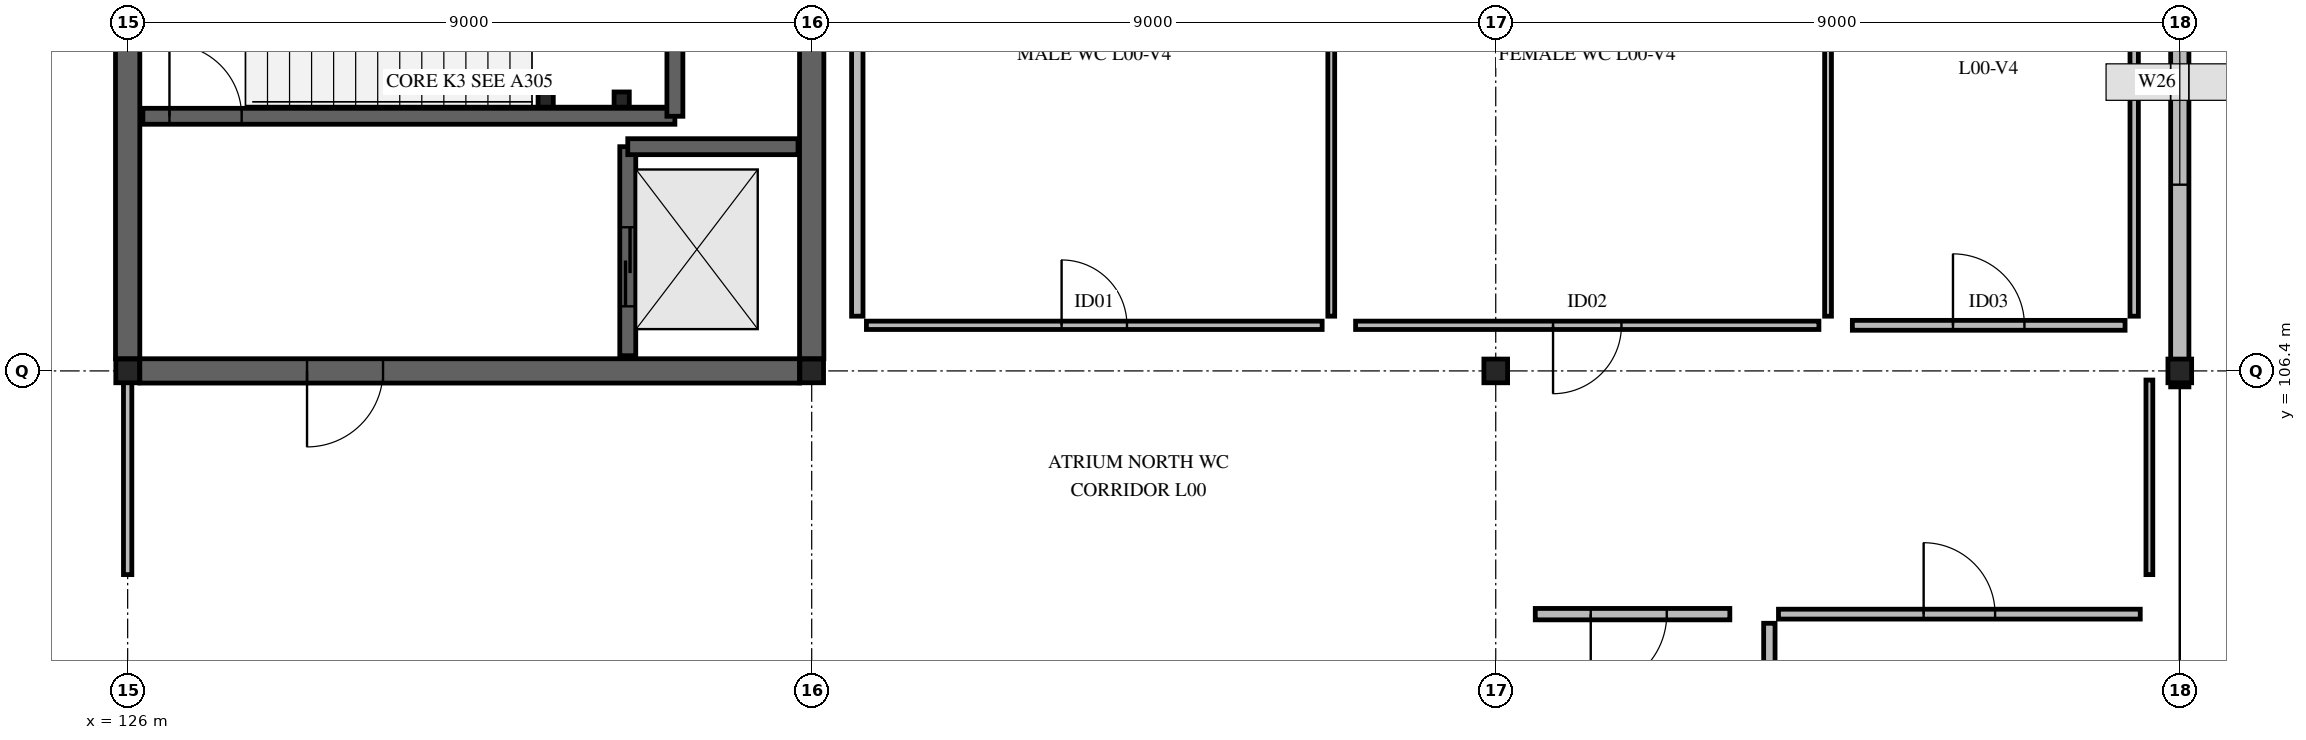
"""IFC4 building model, lengths in metres.
Left out: names, types, materials, properties, quantities, classifications, styles, units other than length and angle.
Written with IfcOpenShell. Run it as: python <this file> out.ifc"""

import sys

from ifc_helpers import new_model, si_unit, direction, frame, frame_2d, origin, origin_2d, place, context, subcontext, project, spatial, rectangle, hollow_rectangle, i_section, extrude, element, fill, save


model = new_model("IFC4")
c1 = context("Model", 3, precision=1e-05, world=origin(), true_north=direction((0.0, 1.0)))
c2 = subcontext(c1, "Body", "Model", "MODEL_VIEW")
j1 = project(units=[si_unit("LENGTHUNIT", "METRE"), si_unit("PLANEANGLEUNIT", "RADIAN")], contexts=[c1])
p1 = place(None, origin())
s1 = spatial("IfcSite", under=j1, at=p1, CompositionType="ELEMENT")
p2 = place(p1, origin())
s2 = spatial("IfcBuilding", under=s1, at=p2, CompositionType="ELEMENT")
p3 = place(p2, origin())
s3 = spatial("IfcBuildingStorey", under=s2, at=p3, CompositionType="ELEMENT", Elevation=0.0)
for number, where, z_axis, x_axis in (
    (1, (126.0, 106.4, 0.0), (0.0, 0.0, 1.0), (1.0, 0.0, 0.0)),
    (2, (135.0, 106.4, 0.0), (0.0, 0.0, 1.0), (1.0, 0.0, 0.0)),
    (3, (144.0, 106.4, 0.0), (0.0, 0.0, 1.0), (1.0, 0.0, 0.0)),
    (4, (153.0, 106.4, 0.0), (0.0, 0.0, 1.0), (1.0, 0.0, 0.0)),
):
    element("IfcColumn", number, at=place(p3, frame(where, z_axis=z_axis, x_axis=x_axis)), inside=s3, PredefinedType="COLUMN", context=c2, shape_type="SweptSolid", body=[
        extrude(i_section(OverallWidth=0.312, OverallDepth=0.312, WebThickness=0.017, FlangeThickness=0.017, FilletRadius=0.015, at=origin_2d()), origin(), (0.0, 0.0, 1.0), 5.04),
    ])
p4 = place(p3, frame((153.0, 106.19, 0.0), z_axis=(0.0, 0.0, 1.0), x_axis=(0.0, 1.0, 0.0)))
e5 = element("IfcWall", 5, at=p4, inside=s3, PredefinedType="STANDARD", context=c2, shape_type="SweptSolid", body=[
    extrude(rectangle(XDim=7.81, YDim=0.24, at=frame_2d((3.905, 0.0))), origin(), (0.0, 0.0, 1.0), 4.508),
])
p5 = place(p4, frame((2.66, 0.0, 0.85)))
e6 = element("IfcOpeningElement", 6, at=p5, cuts=e5, PredefinedType="OPENING", context=c2, shape_type="SweptSolid", body=[
    extrude(rectangle(XDim=2.7, YDim=1.5, at=frame_2d((1.35, 0.75))), frame((0.0, 0.13, 0.0), z_axis=(0.0, -1.0, 0.0), x_axis=(1.0, 0.0, 0.0)), (0.0, 0.0, 1.0), 0.26),
])
p6 = place(p3, frame((126.16, 106.4, 0.0), z_axis=(0.0, 0.0, 1.0), x_axis=(1.0, 0.0, 0.0)))
e7 = element("IfcWall", 7, at=p6, inside=s3, PredefinedType="SHEAR", context=c2, shape_type="SweptSolid", body=[
    extrude(rectangle(XDim=8.68, YDim=0.32, at=frame_2d((4.34, 0.0))), origin(), (0.0, 0.0, 1.0), 4.76),
])
p7 = place(p6, frame((2.2, 0.0, 0.0)))
e8 = element("IfcOpeningElement", 8, at=p7, cuts=e7, PredefinedType="OPENING", context=c2, shape_type="SweptSolid", body=[
    extrude(rectangle(XDim=1.0, YDim=2.15, at=frame_2d((0.5, 1.075))), frame((0.0, 0.17, 0.0), z_axis=(0.0, -1.0, 0.0), x_axis=(1.0, 0.0, 0.0)), (0.0, 0.0, 1.0), 0.34),
])
for number, where, z_axis, x_axis in (
    (9, (126.0, 106.56, 0.0), (0.0, 0.0, 1.0), (0.0, 1.0, 0.0)),
    (10, (135.0, 106.56, 0.0), (0.0, 0.0, 1.0), (0.0, 1.0, 0.0)),
):
    element("IfcWall", number, at=place(p3, frame(where, z_axis=z_axis, x_axis=x_axis)), inside=s3, PredefinedType="SHEAR", context=c2, shape_type="SweptSolid", body=[
        extrude(rectangle(XDim=7.28, YDim=0.32, at=frame_2d((3.64, 0.0))), origin(), (0.0, 0.0, 1.0), 4.76),
    ])
p8 = place(p3, frame((126.2, 109.75, 0.0), z_axis=(0.0, 0.0, 1.0), x_axis=(1.0, 0.0, 0.0)))
e11 = element("IfcWall", 11, at=p8, inside=s3, PredefinedType="SOLIDWALL", context=c2, shape_type="SweptSolid", body=[
    extrude(rectangle(XDim=7.0, YDim=0.21, at=frame_2d((3.5, 0.0))), origin(), (0.0, 0.0, 1.0), 4.76),
])
p9 = place(p8, frame((0.35, 0.0, 0.0)))
e12 = element("IfcOpeningElement", 12, at=p9, cuts=e11, PredefinedType="OPENING", context=c2, shape_type="SweptSolid", body=[
    extrude(rectangle(XDim=0.95, YDim=2.12, at=frame_2d((0.475, 1.06))), frame((0.0, 0.115, 0.0), z_axis=(0.0, -1.0, 0.0), x_axis=(1.0, 0.0, 0.0)), (0.0, 0.0, 1.0), 0.23),
])
p10 = place(p3, frame((133.2, 109.75, 0.0), z_axis=(0.0, 0.0, 1.0), x_axis=(0.0, 1.0, 0.0)))
e13 = element("IfcWall", 13, at=p10, inside=s3, PredefinedType="SOLIDWALL", context=c2, shape_type="SweptSolid", body=[
    extrude(rectangle(XDim=4.05, YDim=0.21, at=frame_2d((2.025, 0.0))), origin(), (0.0, 0.0, 1.0), 4.76),
])
p11 = place(p3, frame((132.58, 106.6, 0.0), z_axis=(0.0, 0.0, 1.0), x_axis=(0.0, 1.0, 0.0)))
e14 = element("IfcWall", 14, at=p11, inside=s3, PredefinedType="SOLIDWALL", context=c2, shape_type="SweptSolid", body=[
    extrude(rectangle(XDim=2.75, YDim=0.21, at=frame_2d((1.375, 0.0))), origin(), (0.0, 0.0, 1.0), 4.76),
])
p12 = place(p11, frame((0.65, 0.0, 0.0)))
e15 = element("IfcOpeningElement", 15, at=p12, cuts=e14, PredefinedType="OPENING", context=c2, shape_type="SweptSolid", body=[
    extrude(rectangle(XDim=1.04, YDim=2.1, at=frame_2d((0.52, 1.05))), frame((0.0, 0.115, 0.0), z_axis=(0.0, -1.0, 0.0), x_axis=(1.0, 0.0, 0.0)), (0.0, 0.0, 1.0), 0.23),
])
p13 = place(p3, frame((132.58, 109.35, 0.0), z_axis=(0.0, 0.0, 1.0), x_axis=(1.0, 0.0, 0.0)))
e16 = element("IfcWall", 16, at=p13, inside=s3, PredefinedType="SOLIDWALL", context=c2, shape_type="SweptSolid", body=[
    extrude(rectangle(XDim=2.24, YDim=0.21, at=frame_2d((1.12, 0.0))), origin(), (0.0, 0.0, 1.0), 4.76),
])
for number, where, z_axis, x_axis in (
    (17, (131.5, 109.97, 0.0), (0.0, 0.0, 1.0), (1.0, 0.0, 0.0)),
    (18, (132.5, 109.97, 0.0), (0.0, 0.0, 1.0), (1.0, 0.0, 0.0)),
):
    element("IfcColumn", number, at=place(p3, frame(where, z_axis=z_axis, x_axis=x_axis)), inside=s3, PredefinedType="COLUMN", context=c2, shape_type="SweptSolid", body=[
        extrude(hollow_rectangle(XDim=0.2, YDim=0.2, WallThickness=0.012, at=origin_2d()), origin(), (0.0, 0.0, 1.0), 5.04),
    ])
p14 = place(p3, frame((135.72, 107.0, 0.0), z_axis=(0.0, 0.0, 1.0), x_axis=(1.0, 0.0, 0.0)))
e19 = element("IfcWall", 19, at=p14, inside=s3, PredefinedType="PARTITIONING", context=c2, shape_type="SweptSolid", body=[
    extrude(rectangle(XDim=5.996, YDim=0.11, at=frame_2d((2.998, 0.0))), origin(), (0.0, 0.0, 1.0), 4.76),
])
p15 = place(p14, frame((2.568, 0.0, 0.0)))
e20 = element("IfcOpeningElement", 20, at=p15, cuts=e19, PredefinedType="OPENING", context=c2, shape_type="SweptSolid", body=[
    extrude(rectangle(XDim=0.86, YDim=2.06, at=frame_2d((0.43, 1.03))), frame((0.0, 0.065, 0.0), z_axis=(0.0, -1.0, 0.0), x_axis=(1.0, 0.0, 0.0)), (0.0, 0.0, 1.0), 0.13),
])
p16 = place(p3, frame((141.836, 107.12, 0.0), z_axis=(0.0, 0.0, 1.0), x_axis=(0.0, 1.0, 0.0)))
e21 = element("IfcWall", 21, at=p16, inside=s3, PredefinedType="PARTITIONING", context=c2, shape_type="SweptSolid", body=[
    extrude(rectangle(XDim=6.16, YDim=0.09, at=frame_2d((3.08, 0.0))), origin(), (0.0, 0.0, 1.0), 4.76),
])
p17 = place(p3, frame((135.6, 107.12, 0.0), z_axis=(0.0, 0.0, 1.0), x_axis=(0.0, 1.0, 0.0)))
e22 = element("IfcWall", 22, at=p17, inside=s3, PredefinedType="PARTITIONING", context=c2, shape_type="SweptSolid", body=[
    extrude(rectangle(XDim=6.16, YDim=0.15, at=frame_2d((3.08, 0.0))), origin(), (0.0, 0.0, 1.0), 4.76),
])
p18 = place(p3, frame((142.156, 107.0, 0.0), z_axis=(0.0, 0.0, 1.0), x_axis=(1.0, 0.0, 0.0)))
e23 = element("IfcWall", 23, at=p18, inside=s3, PredefinedType="PARTITIONING", context=c2, shape_type="SweptSolid", body=[
    extrude(rectangle(XDim=6.096, YDim=0.11, at=frame_2d((3.048, 0.0))), origin(), (0.0, 0.0, 1.0), 4.76),
])
p19 = place(p18, frame((2.598, 0.0, 0.0)))
e24 = element("IfcOpeningElement", 24, at=p19, cuts=e23, PredefinedType="OPENING", context=c2, shape_type="SweptSolid", body=[
    extrude(rectangle(XDim=0.9, YDim=2.06, at=frame_2d((0.45, 1.03))), frame((0.0, 0.065, 0.0), z_axis=(0.0, -1.0, 0.0), x_axis=(1.0, 0.0, 0.0)), (0.0, 0.0, 1.0), 0.13),
])
p20 = place(p3, frame((148.372, 107.12, 0.0), z_axis=(0.0, 0.0, 1.0), x_axis=(0.0, 1.0, 0.0)))
e25 = element("IfcWall", 25, at=p20, inside=s3, PredefinedType="PARTITIONING", context=c2, shape_type="SweptSolid", body=[
    extrude(rectangle(XDim=6.16, YDim=0.09, at=frame_2d((3.08, 0.0))), origin(), (0.0, 0.0, 1.0), 4.76),
])
p21 = place(p3, frame((148.692, 107.0, 0.0), z_axis=(0.0, 0.0, 1.0), x_axis=(1.0, 0.0, 0.0)))
e26 = element("IfcWall", 26, at=p21, inside=s3, PredefinedType="PARTITIONING", context=c2, shape_type="SweptSolid", body=[
    extrude(rectangle(XDim=3.588, YDim=0.13, at=frame_2d((1.794, 0.0))), origin(), (0.0, 0.0, 1.0), 4.76),
])
p22 = place(p21, frame((1.324, 0.0, 0.0)))
e27 = element("IfcOpeningElement", 27, at=p22, cuts=e26, PredefinedType="OPENING", context=c2, shape_type="SweptSolid", body=[
    extrude(rectangle(XDim=0.94, YDim=2.06, at=frame_2d((0.47, 1.03))), frame((0.0, 0.075, 0.0), z_axis=(0.0, -1.0, 0.0), x_axis=(1.0, 0.0, 0.0)), (0.0, 0.0, 1.0), 0.15),
])
p23 = place(p3, frame((152.4, 107.12, 0.0), z_axis=(0.0, 0.0, 1.0), x_axis=(0.0, 1.0, 0.0)))
e28 = element("IfcWall", 28, at=p23, inside=s3, PredefinedType="PARTITIONING", context=c2, shape_type="SweptSolid", body=[
    extrude(rectangle(XDim=6.16, YDim=0.11, at=frame_2d((3.08, 0.0))), origin(), (0.0, 0.0, 1.0), 4.76),
])
p24 = place(p3, frame((147.6, 61.32, 0.0), z_axis=(0.0, 0.0, 1.0), x_axis=(0.0, 1.0, 0.0)))
e29 = element("IfcWall", 29, at=p24, inside=s3, PredefinedType="PARTITIONING", context=c2, shape_type="SweptSolid", body=[
    extrude(rectangle(XDim=41.76, YDim=0.15, at=frame_2d((20.88, 0.0))), origin(), (0.0, 0.0, 1.0), 4.76),
])
p25 = place(p24, frame((20.13, 0.0, 0.0)))
e30 = element("IfcOpeningElement", 30, at=p25, cuts=e29, PredefinedType="OPENING", context=c2, shape_type="SweptSolid", body=[
    extrude(rectangle(XDim=1.0, YDim=2.15, at=frame_2d((0.5, 1.075))), frame((0.0, 0.085, 0.0), z_axis=(0.0, -1.0, 0.0), x_axis=(1.0, 0.0, 0.0)), (0.0, 0.0, 1.0), 0.17),
])
p26 = place(p3, frame((147.72, 103.2, 0.0), z_axis=(0.0, 0.0, 1.0), x_axis=(1.0, 0.0, 0.0)))
e31 = element("IfcWall", 31, at=p26, inside=s3, PredefinedType="PARTITIONING", context=c2, shape_type="SweptSolid", body=[
    extrude(rectangle(XDim=4.76, YDim=0.13, at=frame_2d((2.38, 0.0))), origin(), (0.0, 0.0, 1.0), 4.76),
])
p27 = place(p26, frame((1.91, 0.0, 0.0)))
e32 = element("IfcOpeningElement", 32, at=p27, cuts=e31, PredefinedType="OPENING", context=c2, shape_type="SweptSolid", body=[
    extrude(rectangle(XDim=0.94, YDim=2.06, at=frame_2d((0.47, 1.03))), frame((0.0, 0.075, 0.0), z_axis=(0.0, -1.0, 0.0), x_axis=(1.0, 0.0, 0.0)), (0.0, 0.0, 1.0), 0.15),
])
p28 = place(p3, frame((144.52, 103.2, 0.0), z_axis=(0.0, 0.0, 1.0), x_axis=(1.0, 0.0, 0.0)))
e33 = element("IfcWall", 33, at=p28, inside=s3, PredefinedType="PARTITIONING", context=c2, shape_type="SweptSolid", body=[
    extrude(rectangle(XDim=2.56, YDim=0.15, at=frame_2d((1.28, 0.0))), origin(), (0.0, 0.0, 1.0), 4.76),
])
p29 = place(p28, frame((0.73, 0.0, 0.0)))
e34 = element("IfcOpeningElement", 34, at=p29, cuts=e33, PredefinedType="OPENING", context=c2, shape_type="SweptSolid", body=[
    extrude(rectangle(XDim=1.0, YDim=2.15, at=frame_2d((0.5, 1.075))), frame((0.0, 0.085, 0.0), z_axis=(0.0, -1.0, 0.0), x_axis=(1.0, 0.0, 0.0)), (0.0, 0.0, 1.0), 0.17),
])
p30 = place(p3, frame((126.0, 103.72, 0.0), z_axis=(0.0, 0.0, 1.0), x_axis=(0.0, 1.0, 0.0)))
e35 = element("IfcWall", 35, at=p30, inside=s3, PredefinedType="PARTITIONING", context=c2, shape_type="SweptSolid", body=[
    extrude(rectangle(XDim=2.56, YDim=0.11, at=frame_2d((1.28, 0.0))), origin(), (0.0, 0.0, 1.0), 4.351),
])
p31 = place(p3, frame((152.6, 103.72, 0.0), z_axis=(0.0, 0.0, 1.0), x_axis=(0.0, 1.0, 0.0)))
e36 = element("IfcWall", 36, at=p31, inside=s3, PredefinedType="PARTITIONING", context=c2, shape_type="SweptSolid", body=[
    extrude(rectangle(XDim=2.56, YDim=0.09, at=frame_2d((1.28, 0.0))), origin(), (0.0, 0.0, 1.0), 4.76),
])
p32 = place(p5, origin())
e37 = element("IfcWindow", 37, at=p32, inside=s3, PartitioningType="SINGLE_PANEL", PredefinedType="WINDOW", context=c2, shape_type="SweptSolid", body=[
    extrude(rectangle(XDim=2.7, YDim=1.5, at=frame_2d((1.35, 0.75))), frame((0.0, 0.03, 0.0), z_axis=(0.0, -1.0, 0.0), x_axis=(1.0, 0.0, 0.0)), (0.0, 0.0, 1.0), 0.06),
])
fill(e6, e37)
p33 = place(p9, origin())
e38 = element("IfcDoor", 38, at=p33, inside=s3, OperationType="SINGLE_SWING_LEFT", PredefinedType="DOOR", context=c2, shape_type="SweptSolid", body=[
    extrude(rectangle(XDim=0.95, YDim=2.12, at=frame_2d((0.475, 1.06))), frame((0.0, 0.025, 0.0), z_axis=(0.0, -1.0, 0.0), x_axis=(1.0, 0.0, 0.0)), (0.0, 0.0, 1.0), 0.05),
])
fill(e12, e38)
p34 = place(p12, origin())
e39 = element("IfcDoor", 39, at=p34, inside=s3, OperationType="SLIDING_TO_LEFT", PredefinedType="DOOR", context=c2, shape_type="SweptSolid", body=[
    extrude(rectangle(XDim=1.04, YDim=2.1, at=frame_2d((0.52, 1.05))), frame((0.0, 0.025, 0.0), z_axis=(0.0, -1.0, 0.0), x_axis=(1.0, 0.0, 0.0)), (0.0, 0.0, 1.0), 0.05),
])
fill(e15, e39)
p35 = place(p7, origin())
e40 = element("IfcDoor", 40, at=p35, inside=s3, OperationType="SINGLE_SWING_RIGHT", PredefinedType="DOOR", context=c2, shape_type="SweptSolid", body=[
    extrude(rectangle(XDim=1.0, YDim=2.15, at=frame_2d((0.5, 1.075))), frame((0.0, 0.025, 0.0), z_axis=(0.0, -1.0, 0.0), x_axis=(1.0, 0.0, 0.0)), (0.0, 0.0, 1.0), 0.05),
])
fill(e8, e40)
p36 = place(p15, origin())
e41 = element("IfcDoor", 41, at=p36, inside=s3, OperationType="SINGLE_SWING_LEFT", PredefinedType="DOOR", context=c2, shape_type="SweptSolid", body=[
    extrude(rectangle(XDim=0.86, YDim=2.06, at=frame_2d((0.43, 1.03))), frame((0.0, 0.025, 0.0), z_axis=(0.0, -1.0, 0.0), x_axis=(1.0, 0.0, 0.0)), (0.0, 0.0, 1.0), 0.05),
])
fill(e20, e41)
p37 = place(p19, origin())
e42 = element("IfcDoor", 42, at=p37, inside=s3, OperationType="SINGLE_SWING_RIGHT", PredefinedType="DOOR", context=c2, shape_type="SweptSolid", body=[
    extrude(rectangle(XDim=0.9, YDim=2.06, at=frame_2d((0.45, 1.03))), frame((0.0, 0.025, 0.0), z_axis=(0.0, -1.0, 0.0), x_axis=(1.0, 0.0, 0.0)), (0.0, 0.0, 1.0), 0.05),
])
fill(e24, e42)
p38 = place(p22, origin())
e43 = element("IfcDoor", 43, at=p38, inside=s3, OperationType="SINGLE_SWING_LEFT", PredefinedType="DOOR", context=c2, shape_type="SweptSolid", body=[
    extrude(rectangle(XDim=0.94, YDim=2.06, at=frame_2d((0.47, 1.03))), frame((0.0, 0.025, 0.0), z_axis=(0.0, -1.0, 0.0), x_axis=(1.0, 0.0, 0.0)), (0.0, 0.0, 1.0), 0.05),
])
fill(e27, e43)
p39 = place(p29, origin())
e44 = element("IfcDoor", 44, at=p39, inside=s3, OperationType="SINGLE_SWING_RIGHT", PredefinedType="DOOR", context=c2, shape_type="SweptSolid", body=[
    extrude(rectangle(XDim=1.0, YDim=2.15, at=frame_2d((0.5, 1.075))), frame((0.0, 0.025, 0.0), z_axis=(0.0, -1.0, 0.0), x_axis=(1.0, 0.0, 0.0)), (0.0, 0.0, 1.0), 0.05),
])
fill(e34, e44)
p40 = place(p27, origin())
e45 = element("IfcDoor", 45, at=p40, inside=s3, OperationType="SINGLE_SWING_LEFT", PredefinedType="DOOR", context=c2, shape_type="SweptSolid", body=[
    extrude(rectangle(XDim=0.94, YDim=2.06, at=frame_2d((0.47, 1.03))), frame((0.0, 0.025, 0.0), z_axis=(0.0, -1.0, 0.0), x_axis=(1.0, 0.0, 0.0)), (0.0, 0.0, 1.0), 0.05),
])
fill(e32, e45)
save(model, sys.argv[1])
